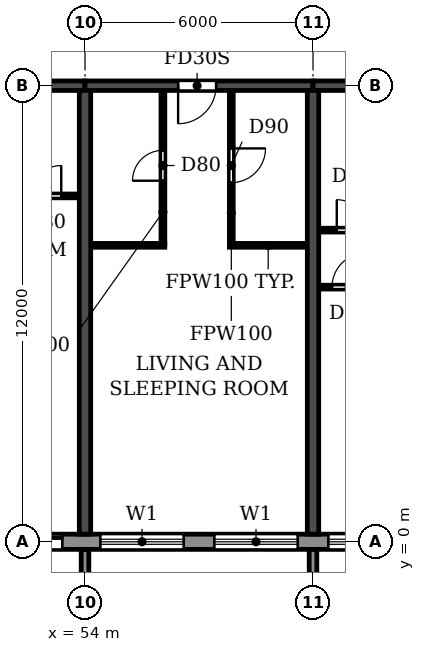
"""IFC4 building model, lengths in metres.
Left out: names, types, materials, properties, quantities, classifications, styles, units other than length and angle.
Written with IfcOpenShell. Run it as: python <this file> out.ifc"""

import sys

from ifc_helpers import new_model, si_unit, direction, frame, frame_2d, origin, place, context, subcontext, project, spatial, polyline, rectangle, outline, extrude, source, transform, mapped, element, fill, save


model = new_model("IFC4")
c1 = context("Model", 3, precision=1e-05, world=origin(), true_north=direction((0.0, 1.0)))
c2 = subcontext(c1, "Body", "Model", "MODEL_VIEW")
j1 = project(units=[si_unit("LENGTHUNIT", "METRE"), si_unit("PLANEANGLEUNIT", "RADIAN")], contexts=[c1])
p1 = place(None, origin())
s1 = spatial("IfcSite", under=j1, at=p1, CompositionType="ELEMENT")
p2 = place(p1, origin())
s2 = spatial("IfcBuilding", under=s1, at=p2, CompositionType="ELEMENT")
p3 = place(p2, frame((0.0, 0.0, 122.4)))
s3 = spatial("IfcBuildingStorey", under=s2, at=p3, CompositionType="ELEMENT", Elevation=122.4)
for number, where, z_axis, x_axis in (
    (1, (54.0, 0.2, 0.0), (0.0, 0.0, 1.0), (0.0, 1.0, 0.0)),
    (2, (60.0, 0.2, 0.0), (0.0, 0.0, 1.0), (0.0, 1.0, 0.0)),
):
    element("IfcWall", number, at=place(p3, frame(where, z_axis=z_axis, x_axis=x_axis)), inside=s3, PredefinedType="SHEAR", context=c2, shape_type="SweptSolid", body=[
        extrude(rectangle(XDim=11.675, YDim=0.3, at=frame_2d((5.837, 0.0))), origin(), (0.0, 0.0, 1.0), 3.07),
    ])
p4 = place(p3, frame((48.0, 12.0, 0.0), z_axis=(0.0, 0.0, 1.0), x_axis=(1.0, 0.0, 0.0)))
e3 = element("IfcWall", 3, at=p4, inside=s3, PredefinedType="SHEAR", context=c2, shape_type="SweptSolid", body=[
    extrude(rectangle(XDim=6.0, YDim=0.25, at=frame_2d((3.0, 0.0))), origin(), (0.0, 0.0, 1.0), 2.47),
])
p5 = place(p4, frame((2.55, 0.0, 0.0)))
e4 = element("IfcOpeningElement", 4, at=p5, cuts=e3, PredefinedType="OPENING", context=c2, shape_type="SweptSolid", body=[
    extrude(rectangle(XDim=1.0, YDim=2.1, at=frame_2d((0.5, 1.05))), frame((0.0, 0.135, 0.0), z_axis=(0.0, -1.0, 0.0), x_axis=(1.0, 0.0, 0.0)), (0.0, 0.0, 1.0), 0.27),
])
p6 = place(p3, frame((54.0, 12.0, 0.0), z_axis=(0.0, 0.0, 1.0), x_axis=(1.0, 0.0, 0.0)))
e5 = element("IfcWall", 5, at=p6, inside=s3, PredefinedType="SHEAR", context=c2, shape_type="SweptSolid", body=[
    extrude(rectangle(XDim=6.0, YDim=0.25, at=frame_2d((3.0, 0.0))), origin(), (0.0, 0.0, 1.0), 2.47),
])
p7 = place(p6, frame((2.45, 0.0, 0.0)))
e6 = element("IfcOpeningElement", 6, at=p7, cuts=e5, PredefinedType="OPENING", context=c2, shape_type="SweptSolid", body=[
    extrude(rectangle(XDim=1.0, YDim=2.1, at=frame_2d((0.5, 1.05))), frame((0.0, 0.135, 0.0), z_axis=(0.0, -1.0, 0.0), x_axis=(1.0, 0.0, 0.0)), (0.0, 0.0, 1.0), 0.27),
])
p8 = place(p3, frame((60.0, 12.0, 0.0), z_axis=(0.0, 0.0, 1.0), x_axis=(1.0, 0.0, 0.0)))
e7 = element("IfcWall", 7, at=p8, inside=s3, PredefinedType="SHEAR", context=c2, shape_type="SweptSolid", body=[
    extrude(rectangle(XDim=6.0, YDim=0.25, at=frame_2d((3.0, 0.0))), origin(), (0.0, 0.0, 1.0), 2.47),
])
p9 = place(p8, frame((2.45, 0.0, 0.0)))
e8 = element("IfcOpeningElement", 8, at=p9, cuts=e7, PredefinedType="OPENING", context=c2, shape_type="SweptSolid", body=[
    extrude(rectangle(XDim=1.0, YDim=2.1, at=frame_2d((0.5, 1.05))), frame((0.0, 0.135, 0.0), z_axis=(0.0, -1.0, 0.0), x_axis=(1.0, 0.0, 0.0)), (0.0, 0.0, 1.0), 0.27),
])
p10 = place(p3, frame((16.683, 0.0, 0.0), z_axis=(0.0, 0.0, 1.0), x_axis=(1.0, 0.0, 0.0)))
e9 = element("IfcWall", 9, at=p10, inside=s3, PredefinedType="STANDARD", context=c2, shape_type="SweptSolid", body=[
    extrude(rectangle(XDim=68.634, YDim=0.4, at=frame_2d((34.317, 0.0))), origin(), (0.0, 0.0, 1.0), 3.07),
])
p11 = place(p10, frame((1.717, 0.0, 0.9)))
e10 = element("IfcOpeningElement", 10, at=p11, cuts=e9, PredefinedType="OPENING", context=c2, shape_type="SweptSolid", body=[
    extrude(rectangle(XDim=2.2, YDim=1.5, at=frame_2d((1.1, 0.75))), frame((0.0, 0.21, 0.0), z_axis=(0.0, -1.0, 0.0), x_axis=(1.0, 0.0, 0.0)), (0.0, 0.0, 1.0), 0.42),
])
p12 = place(p10, frame((4.717, 0.0, 0.9)))
e11 = element("IfcOpeningElement", 11, at=p12, cuts=e9, PredefinedType="OPENING", context=c2, shape_type="SweptSolid", body=[
    extrude(rectangle(XDim=2.2, YDim=1.5, at=frame_2d((1.1, 0.75))), frame((0.0, 0.21, 0.0), z_axis=(0.0, -1.0, 0.0), x_axis=(1.0, 0.0, 0.0)), (0.0, 0.0, 1.0), 0.42),
])
p13 = place(p10, frame((7.717, 0.0, 0.9)))
e12 = element("IfcOpeningElement", 12, at=p13, cuts=e9, PredefinedType="OPENING", context=c2, shape_type="SweptSolid", body=[
    extrude(rectangle(XDim=2.2, YDim=1.5, at=frame_2d((1.1, 0.75))), frame((0.0, 0.21, 0.0), z_axis=(0.0, -1.0, 0.0), x_axis=(1.0, 0.0, 0.0)), (0.0, 0.0, 1.0), 0.42),
])
p14 = place(p10, frame((10.717, 0.0, 0.9)))
e13 = element("IfcOpeningElement", 13, at=p14, cuts=e9, PredefinedType="OPENING", context=c2, shape_type="SweptSolid", body=[
    extrude(rectangle(XDim=2.2, YDim=1.5, at=frame_2d((1.1, 0.75))), frame((0.0, 0.21, 0.0), z_axis=(0.0, -1.0, 0.0), x_axis=(1.0, 0.0, 0.0)), (0.0, 0.0, 1.0), 0.42),
])
p15 = place(p10, frame((13.717, 0.0, 0.9)))
e14 = element("IfcOpeningElement", 14, at=p15, cuts=e9, PredefinedType="OPENING", context=c2, shape_type="SweptSolid", body=[
    extrude(rectangle(XDim=2.2, YDim=1.5, at=frame_2d((1.1, 0.75))), frame((0.0, 0.21, 0.0), z_axis=(0.0, -1.0, 0.0), x_axis=(1.0, 0.0, 0.0)), (0.0, 0.0, 1.0), 0.42),
])
p16 = place(p10, frame((16.717, 0.0, 0.9)))
e15 = element("IfcOpeningElement", 15, at=p16, cuts=e9, PredefinedType="OPENING", context=c2, shape_type="SweptSolid", body=[
    extrude(rectangle(XDim=2.2, YDim=1.5, at=frame_2d((1.1, 0.75))), frame((0.0, 0.21, 0.0), z_axis=(0.0, -1.0, 0.0), x_axis=(1.0, 0.0, 0.0)), (0.0, 0.0, 1.0), 0.42),
])
p17 = place(p10, frame((19.717, 0.0, 0.9)))
e16 = element("IfcOpeningElement", 16, at=p17, cuts=e9, PredefinedType="OPENING", context=c2, shape_type="SweptSolid", body=[
    extrude(rectangle(XDim=2.2, YDim=1.5, at=frame_2d((1.1, 0.75))), frame((0.0, 0.21, 0.0), z_axis=(0.0, -1.0, 0.0), x_axis=(1.0, 0.0, 0.0)), (0.0, 0.0, 1.0), 0.42),
])
p18 = place(p10, frame((22.917, 0.0, 0.0)))
e17 = element("IfcOpeningElement", 17, at=p18, cuts=e9, PredefinedType="OPENING", context=c2, shape_type="SweptSolid", body=[
    extrude(rectangle(XDim=1.8, YDim=2.4, at=frame_2d((0.9, 1.2))), frame((0.0, 0.21, 0.0), z_axis=(0.0, -1.0, 0.0), x_axis=(1.0, 0.0, 0.0)), (0.0, 0.0, 1.0), 0.42),
])
p19 = place(p10, frame((25.717, 0.0, 0.9)))
e18 = element("IfcOpeningElement", 18, at=p19, cuts=e9, PredefinedType="OPENING", context=c2, shape_type="SweptSolid", body=[
    extrude(rectangle(XDim=2.2, YDim=1.5, at=frame_2d((1.1, 0.75))), frame((0.0, 0.21, 0.0), z_axis=(0.0, -1.0, 0.0), x_axis=(1.0, 0.0, 0.0)), (0.0, 0.0, 1.0), 0.42),
])
p20 = place(p10, frame((28.717, 0.0, 0.9)))
e19 = element("IfcOpeningElement", 19, at=p20, cuts=e9, PredefinedType="OPENING", context=c2, shape_type="SweptSolid", body=[
    extrude(rectangle(XDim=2.2, YDim=1.5, at=frame_2d((1.1, 0.75))), frame((0.0, 0.21, 0.0), z_axis=(0.0, -1.0, 0.0), x_axis=(1.0, 0.0, 0.0)), (0.0, 0.0, 1.0), 0.42),
])
p21 = place(p10, frame((31.717, 0.0, 0.9)))
e20 = element("IfcOpeningElement", 20, at=p21, cuts=e9, PredefinedType="OPENING", context=c2, shape_type="SweptSolid", body=[
    extrude(rectangle(XDim=2.2, YDim=1.5, at=frame_2d((1.1, 0.75))), frame((0.0, 0.21, 0.0), z_axis=(0.0, -1.0, 0.0), x_axis=(1.0, 0.0, 0.0)), (0.0, 0.0, 1.0), 0.42),
])
p22 = place(p10, frame((34.917, 0.0, 0.0)))
e21 = element("IfcOpeningElement", 21, at=p22, cuts=e9, PredefinedType="OPENING", context=c2, shape_type="SweptSolid", body=[
    extrude(rectangle(XDim=1.8, YDim=2.4, at=frame_2d((0.9, 1.2))), frame((0.0, 0.21, 0.0), z_axis=(0.0, -1.0, 0.0), x_axis=(1.0, 0.0, 0.0)), (0.0, 0.0, 1.0), 0.42),
])
p23 = place(p10, frame((37.717, 0.0, 0.9)))
e22 = element("IfcOpeningElement", 22, at=p23, cuts=e9, PredefinedType="OPENING", context=c2, shape_type="SweptSolid", body=[
    extrude(rectangle(XDim=2.2, YDim=1.5, at=frame_2d((1.1, 0.75))), frame((0.0, 0.21, 0.0), z_axis=(0.0, -1.0, 0.0), x_axis=(1.0, 0.0, 0.0)), (0.0, 0.0, 1.0), 0.42),
])
p24 = place(p10, frame((40.717, 0.0, 0.9)))
e23 = element("IfcOpeningElement", 23, at=p24, cuts=e9, PredefinedType="OPENING", context=c2, shape_type="SweptSolid", body=[
    extrude(rectangle(XDim=2.2, YDim=1.5, at=frame_2d((1.1, 0.75))), frame((0.0, 0.21, 0.0), z_axis=(0.0, -1.0, 0.0), x_axis=(1.0, 0.0, 0.0)), (0.0, 0.0, 1.0), 0.42),
])
p25 = place(p10, frame((43.717, 0.0, 0.9)))
e24 = element("IfcOpeningElement", 24, at=p25, cuts=e9, PredefinedType="OPENING", context=c2, shape_type="SweptSolid", body=[
    extrude(rectangle(XDim=2.2, YDim=1.5, at=frame_2d((1.1, 0.75))), frame((0.0, 0.21, 0.0), z_axis=(0.0, -1.0, 0.0), x_axis=(1.0, 0.0, 0.0)), (0.0, 0.0, 1.0), 0.42),
])
p26 = place(p10, frame((46.917, 0.0, 0.0)))
e25 = element("IfcOpeningElement", 25, at=p26, cuts=e9, PredefinedType="OPENING", context=c2, shape_type="SweptSolid", body=[
    extrude(rectangle(XDim=1.8, YDim=2.4, at=frame_2d((0.9, 1.2))), frame((0.0, 0.21, 0.0), z_axis=(0.0, -1.0, 0.0), x_axis=(1.0, 0.0, 0.0)), (0.0, 0.0, 1.0), 0.42),
])
p27 = place(p10, frame((49.717, 0.0, 0.9)))
e26 = element("IfcOpeningElement", 26, at=p27, cuts=e9, PredefinedType="OPENING", context=c2, shape_type="SweptSolid", body=[
    extrude(rectangle(XDim=2.2, YDim=1.5, at=frame_2d((1.1, 0.75))), frame((0.0, 0.21, 0.0), z_axis=(0.0, -1.0, 0.0), x_axis=(1.0, 0.0, 0.0)), (0.0, 0.0, 1.0), 0.42),
])
p28 = place(p10, frame((52.717, 0.0, 0.9)))
e27 = element("IfcOpeningElement", 27, at=p28, cuts=e9, PredefinedType="OPENING", context=c2, shape_type="SweptSolid", body=[
    extrude(rectangle(XDim=2.2, YDim=1.5, at=frame_2d((1.1, 0.75))), frame((0.0, 0.21, 0.0), z_axis=(0.0, -1.0, 0.0), x_axis=(1.0, 0.0, 0.0)), (0.0, 0.0, 1.0), 0.42),
])
p29 = place(p10, frame((55.717, 0.0, 0.9)))
e28 = element("IfcOpeningElement", 28, at=p29, cuts=e9, PredefinedType="OPENING", context=c2, shape_type="SweptSolid", body=[
    extrude(rectangle(XDim=2.2, YDim=1.5, at=frame_2d((1.1, 0.75))), frame((0.0, 0.21, 0.0), z_axis=(0.0, -1.0, 0.0), x_axis=(1.0, 0.0, 0.0)), (0.0, 0.0, 1.0), 0.42),
])
p30 = place(p10, frame((58.917, 0.0, 0.0)))
e29 = element("IfcOpeningElement", 29, at=p30, cuts=e9, PredefinedType="OPENING", context=c2, shape_type="SweptSolid", body=[
    extrude(rectangle(XDim=1.8, YDim=2.4, at=frame_2d((0.9, 1.2))), frame((0.0, 0.21, 0.0), z_axis=(0.0, -1.0, 0.0), x_axis=(1.0, 0.0, 0.0)), (0.0, 0.0, 1.0), 0.42),
])
p31 = place(p10, frame((61.717, 0.0, 0.9)))
e30 = element("IfcOpeningElement", 30, at=p31, cuts=e9, PredefinedType="OPENING", context=c2, shape_type="SweptSolid", body=[
    extrude(rectangle(XDim=2.2, YDim=1.5, at=frame_2d((1.1, 0.75))), frame((0.0, 0.21, 0.0), z_axis=(0.0, -1.0, 0.0), x_axis=(1.0, 0.0, 0.0)), (0.0, 0.0, 1.0), 0.42),
])
p32 = place(p10, frame((64.717, 0.0, 0.9)))
e31 = element("IfcOpeningElement", 31, at=p32, cuts=e9, PredefinedType="OPENING", context=c2, shape_type="SweptSolid", body=[
    extrude(rectangle(XDim=2.2, YDim=1.5, at=frame_2d((1.1, 0.75))), frame((0.0, 0.21, 0.0), z_axis=(0.0, -1.0, 0.0), x_axis=(1.0, 0.0, 0.0)), (0.0, 0.0, 1.0), 0.42),
])
m1 = source(origin(), c2, "Body", "SweptSolid", [
    extrude(outline(polyline([(0.0, 0.0), (0.2, 0.0), (0.2, 1.65), (0.0, 1.65), (0.0, 0.0)])), origin(), (0.0, 0.0, 1.0), 3.1),
])
for number, where in (
    (32, (53.9, -1.85, 0.0)),
    (33, (59.9, -1.85, 0.0)),
):
    element("IfcWall", number, at=place(p3, frame(where)), inside=s3, PredefinedType="STANDARD", context=c2, shape_type="MappedRepresentation", body=[
        mapped(m1, transform((0.0, 0.0, 0.0))),
    ])
p33 = place(p3, frame((60.16, 6.7, 0.0), z_axis=(0.0, 0.0, 1.0), x_axis=(1.0, 0.0, 0.0)))
e34 = element("IfcWall", 34, at=p33, inside=s3, PredefinedType="PARTITIONING", context=c2, shape_type="SweptSolid", body=[
    extrude(rectangle(XDim=2.89, YDim=0.1, at=frame_2d((1.445, 0.0))), origin(), (0.0, 0.0, 1.0), 3.07),
])
p34 = place(p33, frame((0.34, 0.0, 0.0)))
e35 = element("IfcOpeningElement", 35, at=p34, cuts=e34, PredefinedType="OPENING", context=c2, shape_type="SweptSolid", body=[
    extrude(rectangle(XDim=0.9, YDim=2.1, at=frame_2d((0.45, 1.05))), frame((0.0, 0.06, 0.0), z_axis=(0.0, -1.0, 0.0), x_axis=(1.0, 0.0, 0.0)), (0.0, 0.0, 1.0), 0.12),
])
p35 = place(p3, frame((54.16, 7.8, 0.0), z_axis=(0.0, 0.0, 1.0), x_axis=(1.0, 0.0, 0.0)))
e36 = element("IfcWall", 36, at=p35, inside=s3, PredefinedType="PARTITIONING", context=c2, shape_type="SweptSolid", body=[
    extrude(rectangle(XDim=1.94, YDim=0.1, at=frame_2d((0.97, 0.0))), origin(), (0.0, 0.0, 1.0), 3.07),
])
p36 = place(p3, frame((57.8, 7.8, 0.0), z_axis=(0.0, 0.0, 1.0), x_axis=(1.0, 0.0, 0.0)))
e37 = element("IfcWall", 37, at=p36, inside=s3, PredefinedType="PARTITIONING", context=c2, shape_type="SweptSolid", body=[
    extrude(rectangle(XDim=2.04, YDim=0.1, at=frame_2d((1.02, 0.0))), origin(), (0.0, 0.0, 1.0), 3.07),
])
p37 = place(p3, frame((60.16, 8.2, 0.0), z_axis=(0.0, 0.0, 1.0), x_axis=(1.0, 0.0, 0.0)))
e38 = element("IfcWall", 38, at=p37, inside=s3, PredefinedType="PARTITIONING", context=c2, shape_type="SweptSolid", body=[
    extrude(rectangle(XDim=1.94, YDim=0.1, at=frame_2d((0.97, 0.0))), origin(), (0.0, 0.0, 1.0), 3.07),
])
p38 = place(p37, frame((0.465, 0.0, 0.0)))
e39 = element("IfcOpeningElement", 39, at=p38, cuts=e38, PredefinedType="OPENING", context=c2, shape_type="SweptSolid", body=[
    extrude(rectangle(XDim=0.8, YDim=2.1, at=frame_2d((0.4, 1.05))), frame((0.0, 0.06, 0.0), z_axis=(0.0, -1.0, 0.0), x_axis=(1.0, 0.0, 0.0)), (0.0, 0.0, 1.0), 0.12),
])
p39 = place(p3, frame((51.9, 9.1, 0.0), z_axis=(0.0, 0.0, 1.0), x_axis=(1.0, 0.0, 0.0)))
e40 = element("IfcWall", 40, at=p39, inside=s3, PredefinedType="PARTITIONING", context=c2, shape_type="SweptSolid", body=[
    extrude(rectangle(XDim=1.94, YDim=0.1, at=frame_2d((0.97, 0.0))), origin(), (0.0, 0.0, 1.0), 3.07),
])
p40 = place(p39, frame((0.675, 0.0, 0.0)))
e41 = element("IfcOpeningElement", 41, at=p40, cuts=e40, PredefinedType="OPENING", context=c2, shape_type="SweptSolid", body=[
    extrude(rectangle(XDim=0.8, YDim=2.1, at=frame_2d((0.4, 1.05))), frame((0.0, 0.06, 0.0), z_axis=(0.0, -1.0, 0.0), x_axis=(1.0, 0.0, 0.0)), (0.0, 0.0, 1.0), 0.12),
])
p41 = place(p3, frame((56.05, 7.85, 0.0), z_axis=(0.0, 0.0, 1.0), x_axis=(0.0, 1.0, 0.0)))
e42 = element("IfcWall", 42, at=p41, inside=s3, PredefinedType="PARTITIONING", context=c2, shape_type="SweptSolid", body=[
    extrude(rectangle(XDim=4.015, YDim=0.1, at=frame_2d((2.007, 0.0))), origin(), (0.0, 0.0, 1.0), 3.07),
])
p42 = place(p41, frame((1.65, 0.0, 0.0)))
e43 = element("IfcOpeningElement", 43, at=p42, cuts=e42, PredefinedType="OPENING", context=c2, shape_type="SweptSolid", body=[
    extrude(rectangle(XDim=0.8, YDim=2.1, at=frame_2d((0.4, 1.05))), frame((0.0, 0.06, 0.0), z_axis=(0.0, -1.0, 0.0), x_axis=(1.0, 0.0, 0.0)), (0.0, 0.0, 1.0), 0.12),
])
p43 = place(p3, frame((57.85, 7.85, 0.0), z_axis=(0.0, 0.0, 1.0), x_axis=(0.0, 1.0, 0.0)))
e44 = element("IfcWall", 44, at=p43, inside=s3, PredefinedType="PARTITIONING", context=c2, shape_type="SweptSolid", body=[
    extrude(rectangle(XDim=4.015, YDim=0.1, at=frame_2d((2.007, 0.0))), origin(), (0.0, 0.0, 1.0), 3.07),
])
p44 = place(p43, frame((1.6, 0.0, 0.0)))
e45 = element("IfcOpeningElement", 45, at=p44, cuts=e44, PredefinedType="OPENING", context=c2, shape_type="SweptSolid", body=[
    extrude(rectangle(XDim=0.9, YDim=2.1, at=frame_2d((0.45, 1.05))), frame((0.0, 0.06, 0.0), z_axis=(0.0, -1.0, 0.0), x_axis=(1.0, 0.0, 0.0)), (0.0, 0.0, 1.0), 0.12),
])
p45 = place(p22, origin())
e46 = element("IfcDoor", 46, at=p45, inside=s3, OperationType="DOUBLE_DOOR_SLIDING", PredefinedType="DOOR", context=c2, shape_type="SweptSolid", body=[
    extrude(rectangle(XDim=1.8, YDim=2.4, at=frame_2d((0.9, 1.2))), frame((0.0, 0.025, 0.0), z_axis=(0.0, -1.0, 0.0), x_axis=(1.0, 0.0, 0.0)), (0.0, 0.0, 1.0), 0.05),
])
fill(e21, e46)
p46 = place(p23, origin())
e47 = element("IfcWindow", 47, at=p46, inside=s3, PartitioningType="DOUBLE_PANEL_HORIZONTAL", PredefinedType="WINDOW", context=c2, shape_type="SweptSolid", body=[
    extrude(rectangle(XDim=2.2, YDim=1.5, at=frame_2d((1.1, 0.75))), frame((0.0, 0.03, 0.0), z_axis=(0.0, -1.0, 0.0), x_axis=(1.0, 0.0, 0.0)), (0.0, 0.0, 1.0), 0.06),
])
fill(e22, e47)
p47 = place(p24, origin())
e48 = element("IfcWindow", 48, at=p47, inside=s3, PartitioningType="DOUBLE_PANEL_HORIZONTAL", PredefinedType="WINDOW", context=c2, shape_type="SweptSolid", body=[
    extrude(rectangle(XDim=2.2, YDim=1.5, at=frame_2d((1.1, 0.75))), frame((0.0, 0.03, 0.0), z_axis=(0.0, -1.0, 0.0), x_axis=(1.0, 0.0, 0.0)), (0.0, 0.0, 1.0), 0.06),
])
fill(e23, e48)
p48 = place(p25, origin())
e49 = element("IfcWindow", 49, at=p48, inside=s3, PartitioningType="DOUBLE_PANEL_HORIZONTAL", PredefinedType="WINDOW", context=c2, shape_type="SweptSolid", body=[
    extrude(rectangle(XDim=2.2, YDim=1.5, at=frame_2d((1.1, 0.75))), frame((0.0, 0.03, 0.0), z_axis=(0.0, -1.0, 0.0), x_axis=(1.0, 0.0, 0.0)), (0.0, 0.0, 1.0), 0.06),
])
fill(e24, e49)
p49 = place(p40, origin())
e50 = element("IfcDoor", 50, at=p49, inside=s3, OperationType="SINGLE_SWING_RIGHT", PredefinedType="DOOR", context=c2, shape_type="SweptSolid", body=[
    extrude(rectangle(XDim=0.8, YDim=2.1, at=frame_2d((0.4, 1.05))), frame((0.0, 0.025, 0.0), z_axis=(0.0, -1.0, 0.0), x_axis=(1.0, 0.0, 0.0)), (0.0, 0.0, 1.0), 0.05),
])
fill(e41, e50)
p50 = place(p42, origin())
e51 = element("IfcDoor", 51, at=p50, inside=s3, OperationType="SINGLE_SWING_LEFT", PredefinedType="DOOR", context=c2, shape_type="SweptSolid", body=[
    extrude(rectangle(XDim=0.8, YDim=2.1, at=frame_2d((0.4, 1.05))), frame((0.0, 0.025, 0.0), z_axis=(0.0, -1.0, 0.0), x_axis=(1.0, 0.0, 0.0)), (0.0, 0.0, 1.0), 0.05),
])
fill(e43, e51)
p51 = place(p7, frame((1.0, 0.0, 0.0), z_axis=(0.0, 0.0, 1.0), x_axis=(-1.0, 0.0, 0.0)))
e52 = element("IfcDoor", 52, at=p51, inside=s3, OperationType="SINGLE_SWING_RIGHT", PredefinedType="DOOR", context=c2, shape_type="SweptSolid", body=[
    extrude(rectangle(XDim=1.0, YDim=2.1, at=frame_2d((0.5, 1.05))), frame((0.0, 0.025, 0.0), z_axis=(0.0, -1.0, 0.0), x_axis=(1.0, 0.0, 0.0)), (0.0, 0.0, 1.0), 0.05),
])
fill(e6, e52)
p52 = place(p44, frame((0.9, 0.0, 0.0), z_axis=(0.0, 0.0, 1.0), x_axis=(-1.0, 0.0, 0.0)))
e53 = element("IfcDoor", 53, at=p52, inside=s3, OperationType="SINGLE_SWING_LEFT", PredefinedType="DOOR", context=c2, shape_type="SweptSolid", body=[
    extrude(rectangle(XDim=0.9, YDim=2.1, at=frame_2d((0.45, 1.05))), frame((0.0, 0.025, 0.0), z_axis=(0.0, -1.0, 0.0), x_axis=(1.0, 0.0, 0.0)), (0.0, 0.0, 1.0), 0.05),
])
fill(e45, e53)
p53 = place(p34, origin())
e54 = element("IfcDoor", 54, at=p53, inside=s3, OperationType="SINGLE_SWING_RIGHT", PredefinedType="DOOR", context=c2, shape_type="SweptSolid", body=[
    extrude(rectangle(XDim=0.9, YDim=2.1, at=frame_2d((0.45, 1.05))), frame((0.0, 0.025, 0.0), z_axis=(0.0, -1.0, 0.0), x_axis=(1.0, 0.0, 0.0)), (0.0, 0.0, 1.0), 0.05),
])
fill(e35, e54)
p54 = place(p38, origin())
e55 = element("IfcDoor", 55, at=p54, inside=s3, OperationType="SINGLE_SWING_LEFT", PredefinedType="DOOR", context=c2, shape_type="SweptSolid", body=[
    extrude(rectangle(XDim=0.8, YDim=2.1, at=frame_2d((0.4, 1.05))), frame((0.0, 0.025, 0.0), z_axis=(0.0, -1.0, 0.0), x_axis=(1.0, 0.0, 0.0)), (0.0, 0.0, 1.0), 0.05),
])
fill(e39, e55)
save(model, sys.argv[1])
